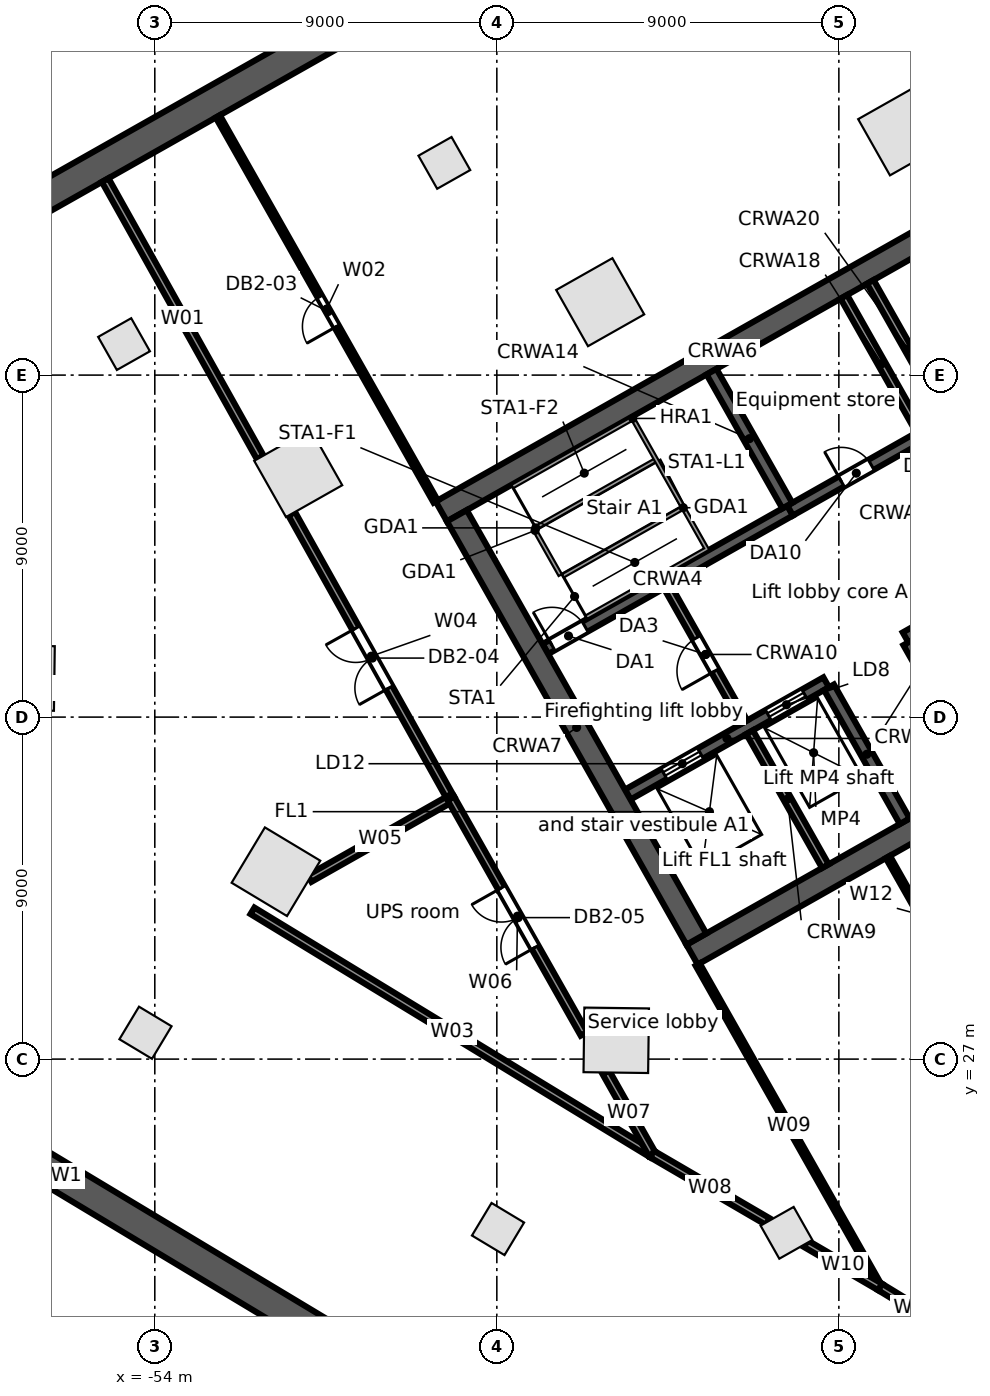
"""IFC4 building model, lengths in metres.
Left out: names, types, materials, properties, quantities, classifications, styles, units other than length and angle.
Written with IfcOpenShell. Run it as: python <this file> out.ifc"""

import sys

from ifc_helpers import new_model, si_unit, direction, frame, frame_2d, origin, origin_2d, place, context, subcontext, project, spatial, rectangle, extrude, element, fill, save


model = new_model("IFC4")
c1 = context("Model", 3, precision=1e-05, world=origin(), true_north=direction((0.0, 1.0)))
c2 = subcontext(c1, "Body", "Model", "MODEL_VIEW")
j1 = project(units=[si_unit("LENGTHUNIT", "METRE"), si_unit("PLANEANGLEUNIT", "RADIAN")], contexts=[c1])
p1 = place(None, origin())
s1 = spatial("IfcSite", under=j1, at=p1, CompositionType="ELEMENT")
p2 = place(p1, origin())
s2 = spatial("IfcBuilding", under=s1, at=p2, CompositionType="ELEMENT")
p3 = place(p2, frame((0.0, 0.0, -9.6)))
s3 = spatial("IfcBuildingStorey", under=s2, at=p3, CompositionType="ELEMENT", Elevation=-9.6)
p4 = place(p3, frame((-5.971, 78.503, -0.5), z_axis=(0.0, 0.0, 1.0), x_axis=(-0.870356741611, -0.492421711882, 0.0)))
e1 = element("IfcWall", 1, at=p4, inside=s3, PredefinedType="SOLIDWALL", context=c2, shape_type="SweptSolid", body=[
    extrude(rectangle(XDim=70.604, YDim=0.8, at=frame_2d((35.302, 0.0))), origin(), (0.0, 0.0, 1.0), 5.3),
])
p5 = place(p3, frame((-66.973, 30.208, -0.5), z_axis=(0.0, 0.0, 1.0), x_axis=(0.85716750858, -0.515037728943, 0.0)))
e2 = element("IfcWall", 2, at=p5, inside=s3, PredefinedType="SOLIDWALL", context=c2, shape_type="SweptSolid", body=[
    extrude(rectangle(XDim=24.44, YDim=0.8, at=frame_2d((12.22, 0.0))), origin(), (0.0, 0.0, 1.0), 5.3),
])
p6 = place(p3, frame((-35.211, 18.197, -0.5), z_axis=(0.0, 0.0, 1.0), x_axis=(0.870356230452, 0.492422615355, 0.0)))
e3 = element("IfcWall", 3, at=p6, inside=s3, PredefinedType="SOLIDWALL", context=c2, shape_type="SweptSolid", body=[
    extrude(rectangle(XDim=41.941, YDim=0.8, at=frame_2d((20.97, 0.0))), origin(), (0.0, 0.0, 1.0), 5.3),
])
for number, where, z_axis, x_axis in (
    (4, (-34.334, 51.414, -0.5), (0.0, 0.0, 1.0), (-0.87, -0.492, 0.0)),
    (5, (-42.28, 46.919, -0.5), (0.0, 0.0, 1.0), (-0.87, -0.492, 0.0)),
    (6, (-50.226, 42.423, -0.5), (0.0, 0.0, 1.0), (-0.87, -0.492, 0.0)),
    (7, (-57.493, 37.027, -0.5), (0.0, 0.0, 1.0), (-0.013, -1.0, 0.0)),
    (8, (-50.812, 31.931, -0.5), (0.0, 0.0, 1.0), (0.857, -0.515, 0.0)),
    (9, (-41.858, 27.495, -0.5), (0.0, 0.0, 1.0), (1.0, -0.013, 0.0)),
):
    element("IfcColumn", number, at=place(p3, frame(where, z_axis=z_axis, x_axis=x_axis)), inside=s3, PredefinedType="COLUMN", context=c2, shape_type="SweptSolid", body=[
        extrude(rectangle(XDim=1.7, YDim=1.7, at=origin_2d()), origin(), (0.0, 0.0, 1.0), 5.3),
    ])
for number, where, z_axis, x_axis in (
    (10, (-46.381, 50.584, -0.5), (0.0, 0.0, 1.0), (-0.87, -0.492, 0.0)),
    (11, (-54.81, 45.816, -0.5), (0.0, 0.0, 1.0), (-0.87, -0.492, 0.0)),
    (12, (-54.245, 27.694, -0.5), (0.0, 0.0, 1.0), (0.857, -0.515, 0.0)),
    (13, (-44.969, 22.528, -0.5), (0.0, 0.0, 1.0), (0.857, -0.515, 0.0)),
    (14, (-37.378, 22.429, -0.5), (0.0, 0.0, 1.0), (0.87, 0.492, 0.0)),
):
    element("IfcColumn", number, at=place(p3, frame(where, z_axis=z_axis, x_axis=x_axis)), inside=s3, PredefinedType="COLUMN", context=c2, shape_type="SweptSolid", body=[
        extrude(rectangle(XDim=1.0, YDim=1.0, at=origin_2d()), origin(), (0.0, 0.0, 1.0), 5.3),
    ])
p7 = place(p3, frame((-39.862, 29.749, 0.0), z_axis=(0.0, 0.0, 1.0), x_axis=(0.870350116061, 0.492433422375, 0.0)))
e15 = element("IfcWall", 15, at=p7, inside=s3, PredefinedType="SOLIDWALL", context=c2, shape_type="SweptSolid", body=[
    extrude(rectangle(XDim=17.0, YDim=0.6, at=frame_2d((8.5, 0.0))), origin(), (0.0, 0.0, 1.0), 4.4),
])
p8 = place(p7, frame((7.2, 0.0, 0.0)))
e16 = element("IfcOpeningElement", 16, at=p8, cuts=e15, PredefinedType="OPENING", context=c2, shape_type="SweptSolid", body=[
    extrude(rectangle(XDim=1.2, YDim=2.1, at=frame_2d((0.6, 1.05))), frame((0.0, 0.31, 0.0), z_axis=(0.0, -1.0, 0.0), x_axis=(1.0, 0.0, 0.0)), (0.0, 0.0, 1.0), 0.62),
])
p9 = place(p3, frame((-41.556, 33.961, 0.0), z_axis=(0.0, 0.0, 1.0), x_axis=(0.870343731308, 0.492444706919, 0.0)))
e17 = element("IfcWall", 17, at=p9, inside=s3, PredefinedType="SOLIDWALL", context=c2, shape_type="SweptSolid", body=[
    extrude(rectangle(XDim=6.0, YDim=0.3, at=frame_2d((3.0, 0.0))), origin(), (0.0, 0.0, 1.0), 4.4),
])
p10 = place(p9, frame((1.1, 0.0, 0.0)))
e18 = element("IfcOpeningElement", 18, at=p10, cuts=e17, PredefinedType="OPENING", context=c2, shape_type="SweptSolid", body=[
    extrude(rectangle(XDim=1.1, YDim=2.1, at=frame_2d((0.55, 1.05))), frame((0.0, 0.16, 0.0), z_axis=(0.0, -1.0, 0.0), x_axis=(1.0, 0.0, 0.0)), (0.0, 0.0, 1.0), 0.32),
])
p11 = place(p9, frame((4.25, 0.0, 0.0)))
e19 = element("IfcOpeningElement", 19, at=p11, cuts=e17, PredefinedType="OPENING", context=c2, shape_type="SweptSolid", body=[
    extrude(rectangle(XDim=1.1, YDim=2.1, at=frame_2d((0.55, 1.05))), frame((0.0, 0.16, 0.0), z_axis=(0.0, -1.0, 0.0), x_axis=(1.0, 0.0, 0.0)), (0.0, 0.0, 1.0), 0.32),
])
p12 = place(p3, frame((-34.245, 38.097, 0.0), z_axis=(0.0, 0.0, 1.0), x_axis=(0.870364910201, 0.492407273597, 0.0)))
e20 = element("IfcWall", 20, at=p12, inside=s3, PredefinedType="SOLIDWALL", context=c2, shape_type="SweptSolid", body=[
    extrude(rectangle(XDim=7.4, YDim=0.3, at=frame_2d((3.7, 0.0))), origin(), (0.0, 0.0, 1.0), 4.4),
])
p13 = place(p12, frame((6.2, 0.0, 0.0)))
e21 = element("IfcOpeningElement", 21, at=p13, cuts=e20, PredefinedType="OPENING", context=c2, shape_type="SweptSolid", body=[
    extrude(rectangle(XDim=1.0, YDim=2.1, at=frame_2d((0.5, 1.05))), frame((0.0, 0.16, 0.0), z_axis=(0.0, -1.0, 0.0), x_axis=(1.0, 0.0, 0.0)), (0.0, 0.0, 1.0), 0.32),
])
p14 = place(p3, frame((-43.723, 37.791, 0.0), z_axis=(0.0, 0.0, 1.0), x_axis=(0.87035077051, 0.49243226567, 0.0)))
e22 = element("IfcWall", 22, at=p14, inside=s3, PredefinedType="SOLIDWALL", context=c2, shape_type="SweptSolid", body=[
    extrude(rectangle(XDim=7.4, YDim=0.3, at=frame_2d((3.7, 0.0))), origin(), (0.0, 0.0, 1.0), 4.4),
])
p15 = place(p14, frame((0.2, 0.0, 0.0)))
e23 = element("IfcOpeningElement", 23, at=p15, cuts=e22, PredefinedType="OPENING", context=c2, shape_type="SweptSolid", body=[
    extrude(rectangle(XDim=1.0, YDim=2.1, at=frame_2d((0.5, 1.05))), frame((0.0, 0.16, 0.0), z_axis=(0.0, -1.0, 0.0), x_axis=(1.0, 0.0, 0.0)), (0.0, 0.0, 1.0), 0.32),
])
p16 = place(p3, frame((-37.282, 41.435, 0.0), z_axis=(0.0, 0.0, 1.0), x_axis=(0.870356516133, 0.492422110414, 0.0)))
e24 = element("IfcWall", 24, at=p16, inside=s3, PredefinedType="SOLIDWALL", context=c2, shape_type="SweptSolid", body=[
    extrude(rectangle(XDim=8.4, YDim=0.3, at=frame_2d((4.2, 0.0))), origin(), (0.0, 0.0, 1.0), 4.4),
])
p17 = place(p16, frame((6.2, 0.0, 0.0)))
e25 = element("IfcOpeningElement", 25, at=p17, cuts=e24, PredefinedType="OPENING", context=c2, shape_type="SweptSolid", body=[
    extrude(rectangle(XDim=1.1, YDim=2.1, at=frame_2d((0.55, 1.05))), frame((0.0, 0.16, 0.0), z_axis=(0.0, -1.0, 0.0), x_axis=(1.0, 0.0, 0.0)), (0.0, 0.0, 1.0), 0.32),
])
p18 = place(p16, frame((1.55, 0.0, 0.0)))
e26 = element("IfcOpeningElement", 26, at=p18, cuts=e24, PredefinedType="OPENING", context=c2, shape_type="SweptSolid", body=[
    extrude(rectangle(XDim=0.9, YDim=2.1, at=frame_2d((0.45, 1.05))), frame((0.0, 0.16, 0.0), z_axis=(0.0, -1.0, 0.0), x_axis=(1.0, 0.0, 0.0)), (0.0, 0.0, 1.0), 0.32),
])
p19 = place(p3, frame((-46.461, 41.412, 0.0), z_axis=(0.0, 0.0, 1.0), x_axis=(0.870350116061, 0.492433422375, 0.0)))
e27 = element("IfcWall", 27, at=p19, inside=s3, PredefinedType="SOLIDWALL", context=c2, shape_type="SweptSolid", body=[
    extrude(rectangle(XDim=17.0, YDim=0.6, at=frame_2d((8.5, 0.0))), origin(), (0.0, 0.0, 1.0), 4.4),
])
p20 = place(p3, frame((-46.052, 41.298, 0.0), z_axis=(0.0, 0.0, 1.0), x_axis=(0.492418598281, -0.870358503186, 0.0)))
e28 = element("IfcWall", 28, at=p20, inside=s3, PredefinedType="SOLIDWALL", context=c2, shape_type="SweptSolid", body=[
    extrude(rectangle(XDim=12.8, YDim=0.6, at=frame_2d((6.4, 0.0))), origin(), (0.0, 0.0, 1.0), 4.4),
])
p21 = place(p3, frame((-38.349, 35.603, 0.0), z_axis=(0.0, 0.0, 1.0), x_axis=(0.49241474071, -0.870360685654, 0.0)))
e29 = element("IfcWall", 29, at=p21, inside=s3, PredefinedType="SOLIDWALL", context=c2, shape_type="SweptSolid", body=[
    extrude(rectangle(XDim=4.05, YDim=0.2, at=frame_2d((2.025, 0.0))), origin(), (0.0, 0.0, 1.0), 4.4),
])
p22 = place(p3, frame((-40.516, 39.433, 0.0), z_axis=(0.0, 0.0, 1.0), x_axis=(0.492453559952, -0.87033872216, 0.0)))
e30 = element("IfcWall", 30, at=p22, inside=s3, PredefinedType="PARTITIONING", context=c2, shape_type="SweptSolid", body=[
    extrude(rectangle(XDim=4.1, YDim=0.2, at=frame_2d((2.05, 0.0))), origin(), (0.0, 0.0, 1.0), 4.4),
])
p23 = place(p22, frame((1.55, 0.0, 0.0)))
e31 = element("IfcOpeningElement", 31, at=p23, cuts=e30, PredefinedType="OPENING", context=c2, shape_type="SweptSolid", body=[
    extrude(rectangle(XDim=1.0, YDim=2.1, at=frame_2d((0.5, 1.05))), frame((0.0, 0.11, 0.0), z_axis=(0.0, -1.0, 0.0), x_axis=(1.0, 0.0, 0.0)), (0.0, 0.0, 1.0), 0.22),
])
p24 = place(p3, frame((-36.26, 36.785, 0.0), z_axis=(0.0, 0.0, 1.0), x_axis=(0.492440575896, -0.870346068648, 0.0)))
e32 = element("IfcWall", 32, at=p24, inside=s3, PredefinedType="SOLIDWALL", context=c2, shape_type="SweptSolid", body=[
    extrude(rectangle(XDim=4.05, YDim=0.3, at=frame_2d((2.025, 0.0))), origin(), (0.0, 0.0, 1.0), 4.4),
])
p25 = place(p3, frame((-39.35, 45.09, 0.0), z_axis=(0.0, 0.0, 1.0), x_axis=(0.49241474071, -0.870360685654, 0.0)))
e33 = element("IfcWall", 33, at=p25, inside=s3, PredefinedType="SOLIDWALL", context=c2, shape_type="SweptSolid", body=[
    extrude(rectangle(XDim=4.05, YDim=0.3, at=frame_2d((2.025, 0.0))), origin(), (0.0, 0.0, 1.0), 4.4),
])
p26 = place(p3, frame((-34.171, 37.967, 0.0), z_axis=(0.0, 0.0, 1.0), x_axis=(0.492394910396, -0.870371904542, 0.0)))
e34 = element("IfcWall", 34, at=p26, inside=s3, PredefinedType="SOLIDWALL", context=c2, shape_type="SweptSolid", body=[
    extrude(rectangle(XDim=4.05, YDim=0.3, at=frame_2d((2.025, 0.0))), origin(), (0.0, 0.0, 1.0), 4.4),
])
p27 = place(p3, frame((-35.869, 47.06, 0.0), z_axis=(0.0, 0.0, 1.0), x_axis=(0.49241474071, -0.870360685654, 0.0)))
e35 = element("IfcWall", 35, at=p27, inside=s3, PredefinedType="SOLIDWALL", context=c2, shape_type="SweptSolid", body=[
    extrude(rectangle(XDim=4.05, YDim=0.2, at=frame_2d((2.025, 0.0))), origin(), (0.0, 0.0, 1.0), 4.4),
])
p28 = place(p3, frame((-35.173, 47.454, 0.0), z_axis=(0.0, 0.0, 1.0), x_axis=(0.492440575896, -0.870346068648, 0.0)))
e36 = element("IfcWall", 36, at=p28, inside=s3, PredefinedType="SOLIDWALL", context=c2, shape_type="SweptSolid", body=[
    extrude(rectangle(XDim=4.05, YDim=0.2, at=frame_2d((2.025, 0.0))), origin(), (0.0, 0.0, 1.0), 4.4),
])
p29 = place(p3, frame((-55.306, 50.131, 0.0), z_axis=(0.0, 0.0, 1.0), x_axis=(0.488006573134, -0.872839953587, 0.0)))
e37 = element("IfcWall", 37, at=p29, inside=s3, PredefinedType="PARTITIONING", context=c2, shape_type="SweptSolid", body=[
    extrude(rectangle(XDim=8.36, YDim=0.2, at=frame_2d((4.18, 0.0))), origin(), (0.0, 0.0, 1.0), 3.68),
])
p30 = place(p3, frame((-52.342, 51.808, 0.0), z_axis=(0.0, 0.0, 1.0), x_axis=(0.492361213904, -0.870390966775, 0.0)))
e38 = element("IfcWall", 38, at=p30, inside=s3, PredefinedType="PARTITIONING", context=c2, shape_type="SweptSolid", body=[
    extrude(rectangle(XDim=11.644, YDim=0.125, at=frame_2d((5.822, 0.0))), origin(), (0.0, 0.0, 1.0), 3.68),
])
p31 = place(p30, frame((5.45, 0.0, 0.0)))
e39 = element("IfcOpeningElement", 39, at=p31, cuts=e38, PredefinedType="OPENING", context=c2, shape_type="SweptSolid", body=[
    extrude(rectangle(XDim=0.9, YDim=2.1, at=frame_2d((0.45, 1.05))), frame((0.0, 0.073, 0.0), z_axis=(0.0, -1.0, 0.0), x_axis=(1.0, 0.0, 0.0)), (0.0, 0.0, 1.0), 0.145),
])
p32 = place(p3, frame((-51.43, 30.902, 0.0), z_axis=(0.0, 0.0, 1.0), x_axis=(0.85415757912, -0.52001425945, 0.0)))
e40 = element("IfcWall", 40, at=p32, inside=s3, PredefinedType="PARTITIONING", context=c2, shape_type="SweptSolid", body=[
    extrude(rectangle(XDim=12.311, YDim=0.2, at=frame_2d((6.156, 0.0))), origin(), (0.0, 0.0, 1.0), 3.768),
])
p33 = place(p3, frame((-50.397, 41.35, 0.0), z_axis=(0.0, 0.0, 1.0), x_axis=(0.487964129566, -0.872863682517, 0.0)))
e41 = element("IfcWall", 41, at=p33, inside=s3, PredefinedType="PARTITIONING", context=c2, shape_type="SweptSolid", body=[
    extrude(rectangle(XDim=8.584, YDim=0.2, at=frame_2d((4.292, 0.0))), origin(), (0.0, 0.0, 1.0), 3.462),
])
p34 = place(p33, frame((3.45, 0.0, 0.0)))
e42 = element("IfcOpeningElement", 42, at=p34, cuts=e41, PredefinedType="OPENING", context=c2, shape_type="SweptSolid", body=[
    extrude(rectangle(XDim=1.8, YDim=2.1, at=frame_2d((0.9, 1.05))), frame((0.0, 0.11, 0.0), z_axis=(0.0, -1.0, 0.0), x_axis=(1.0, 0.0, 0.0)), (0.0, 0.0, 1.0), 0.22),
])
p35 = place(p3, frame((-49.928, 31.752, 0.0), z_axis=(0.0, 0.0, 1.0), x_axis=(0.87032337569, 0.492480681578, 0.0)))
e43 = element("IfcWall", 43, at=p35, inside=s3, PredefinedType="PARTITIONING", context=c2, shape_type="SweptSolid", body=[
    extrude(rectangle(XDim=4.274, YDim=0.2, at=frame_2d((2.137, 0.0))), origin(), (0.0, 0.0, 1.0), 4.4),
])
p36 = place(p3, frame((-46.208, 33.857, 0.0), z_axis=(0.0, 0.0, 1.0), x_axis=(0.492349035507, -0.870397855716, 0.0)))
e44 = element("IfcWall", 44, at=p36, inside=s3, PredefinedType="PARTITIONING", context=c2, shape_type="SweptSolid", body=[
    extrude(rectangle(XDim=7.113, YDim=0.2, at=frame_2d((3.556, 0.0))), origin(), (0.0, 0.0, 1.0), 3.68),
])
p37 = place(p36, frame((2.7, 0.0, 0.0)))
e45 = element("IfcOpeningElement", 45, at=p37, cuts=e44, PredefinedType="OPENING", context=c2, shape_type="SweptSolid", body=[
    extrude(rectangle(XDim=1.8, YDim=2.1, at=frame_2d((0.9, 1.05))), frame((0.0, 0.11, 0.0), z_axis=(0.0, -1.0, 0.0), x_axis=(1.0, 0.0, 0.0)), (0.0, 0.0, 1.0), 0.22),
])
p38 = place(p3, frame((-42.129, 26.648, 0.0), z_axis=(0.0, 0.0, 1.0), x_axis=(0.492298479406, -0.87042645133, 0.0)))
e46 = element("IfcWall", 46, at=p38, inside=s3, PredefinedType="PARTITIONING", context=c2, shape_type="SweptSolid", body=[
    extrude(rectangle(XDim=2.468, YDim=0.2, at=frame_2d((1.234, 0.0))), origin(), (0.0, 0.0, 1.0), 4.4),
])
p39 = place(p3, frame((-40.914, 24.5, 0.0), z_axis=(0.0, 0.0, 1.0), x_axis=(0.863869354875, -0.503715929575, 0.0)))
e47 = element("IfcWall", 47, at=p39, inside=s3, PredefinedType="PARTITIONING", context=c2, shape_type="SweptSolid", body=[
    extrude(rectangle(XDim=3.524, YDim=0.2, at=frame_2d((1.762, 0.0))), origin(), (0.0, 0.0, 1.0), 4.4),
])
p40 = place(p3, frame((-39.715, 29.488, 0.0), z_axis=(0.0, 0.0, 1.0), x_axis=(0.492486226821, -0.870320237839, 0.0)))
e48 = element("IfcWall", 48, at=p40, inside=s3, PredefinedType="PARTITIONING", context=c2, shape_type="SweptSolid", body=[
    extrude(rectangle(XDim=9.75, YDim=0.125, at=frame_2d((4.875, 0.0))), origin(), (0.0, 0.0, 1.0), 3.672),
])
p41 = place(p3, frame((-36.869, 22.142, 0.0), z_axis=(0.0, 0.0, 1.0), x_axis=(0.863923586103, -0.503622911884, 0.0)))
e49 = element("IfcWall", 49, at=p41, inside=s3, PredefinedType="PARTITIONING", context=c2, shape_type="SweptSolid", body=[
    extrude(rectangle(XDim=2.264, YDim=0.2, at=frame_2d((1.132, 0.0))), origin(), (0.0, 0.0, 1.0), 4.4),
])
p42 = place(p3, frame((-34.913, 21.002, 0.0), z_axis=(0.0, 0.0, 1.0), x_axis=(0.853754667267, -0.520675492145, 0.0)))
e50 = element("IfcWall", 50, at=p42, inside=s3, PredefinedType="PARTITIONING", context=c2, shape_type="SweptSolid", body=[
    extrude(rectangle(XDim=2.168, YDim=0.2, at=frame_2d((1.084, 0.0))), origin(), (0.0, 0.0, 1.0), 4.4),
])
p43 = place(p3, frame((-34.71, 32.319, 0.0), z_axis=(0.0, 0.0, 1.0), x_axis=(0.492310098002, -0.870419879946, 0.0)))
e51 = element("IfcWall", 51, at=p43, inside=s3, PredefinedType="PARTITIONING", context=c2, shape_type="SweptSolid", body=[
    extrude(rectangle(XDim=3.5, YDim=0.125, at=frame_2d((1.75, 0.0))), origin(), (0.0, 0.0, 1.0), 3.672),
])
p44 = place(p10, origin())
e52 = element("IfcDoor", 52, at=p44, inside=s3, OperationType="DOUBLE_DOOR_SLIDING", PredefinedType="DOOR", context=c2, shape_type="SweptSolid", body=[
    extrude(rectangle(XDim=1.1, YDim=2.1, at=frame_2d((0.55, 1.05))), frame((0.0, 0.025, 0.0), z_axis=(0.0, -1.0, 0.0), x_axis=(1.0, 0.0, 0.0)), (0.0, 0.0, 1.0), 0.05),
])
fill(e18, e52)
p45 = place(p11, origin())
e53 = element("IfcDoor", 53, at=p45, inside=s3, OperationType="DOUBLE_DOOR_SLIDING", PredefinedType="DOOR", context=c2, shape_type="SweptSolid", body=[
    extrude(rectangle(XDim=1.1, YDim=2.1, at=frame_2d((0.55, 1.05))), frame((0.0, 0.025, 0.0), z_axis=(0.0, -1.0, 0.0), x_axis=(1.0, 0.0, 0.0)), (0.0, 0.0, 1.0), 0.05),
])
fill(e19, e53)
p46 = place(p15, origin())
e54 = element("IfcDoor", 54, at=p46, inside=s3, OperationType="SINGLE_SWING_LEFT", PredefinedType="DOOR", context=c2, shape_type="SweptSolid", body=[
    extrude(rectangle(XDim=1.0, YDim=2.1, at=frame_2d((0.5, 1.05))), frame((0.0, 0.025, 0.0), z_axis=(0.0, -1.0, 0.0), x_axis=(1.0, 0.0, 0.0)), (0.0, 0.0, 1.0), 0.05),
])
fill(e23, e54)
p47 = place(p23, frame((1.0, 0.0, 0.0), z_axis=(0.0, 0.0, 1.0), x_axis=(-1.0, 0.0, 0.0)))
e55 = element("IfcDoor", 55, at=p47, inside=s3, OperationType="SINGLE_SWING_LEFT", PredefinedType="DOOR", context=c2, shape_type="SweptSolid", body=[
    extrude(rectangle(XDim=1.0, YDim=2.1, at=frame_2d((0.5, 1.05))), frame((0.0, 0.025, 0.0), z_axis=(0.0, -1.0, 0.0), x_axis=(1.0, 0.0, 0.0)), (0.0, 0.0, 1.0), 0.05),
])
fill(e31, e55)
p48 = place(p18, origin())
e56 = element("IfcDoor", 56, at=p48, inside=s3, OperationType="SINGLE_SWING_LEFT", PredefinedType="DOOR", context=c2, shape_type="SweptSolid", body=[
    extrude(rectangle(XDim=0.9, YDim=2.1, at=frame_2d((0.45, 1.05))), frame((0.0, 0.025, 0.0), z_axis=(0.0, -1.0, 0.0), x_axis=(1.0, 0.0, 0.0)), (0.0, 0.0, 1.0), 0.05),
])
fill(e26, e56)
p49 = place(p31, frame((0.9, 0.0, 0.0), z_axis=(0.0, 0.0, 1.0), x_axis=(-1.0, 0.0, 0.0)))
e57 = element("IfcDoor", 57, at=p49, inside=s3, OperationType="SINGLE_SWING_LEFT", PredefinedType="DOOR", context=c2, shape_type="SweptSolid", body=[
    extrude(rectangle(XDim=0.9, YDim=2.1, at=frame_2d((0.45, 1.05))), frame((0.0, 0.025, 0.0), z_axis=(0.0, -1.0, 0.0), x_axis=(1.0, 0.0, 0.0)), (0.0, 0.0, 1.0), 0.05),
])
fill(e39, e57)
p50 = place(p34, frame((1.8, 0.0, 0.0), z_axis=(0.0, 0.0, 1.0), x_axis=(-1.0, 0.0, 0.0)))
e58 = element("IfcDoor", 58, at=p50, inside=s3, OperationType="DOUBLE_DOOR_SINGLE_SWING", PredefinedType="DOOR", context=c2, shape_type="SweptSolid", body=[
    extrude(rectangle(XDim=1.8, YDim=2.1, at=frame_2d((0.9, 1.05))), frame((0.0, 0.025, 0.0), z_axis=(0.0, -1.0, 0.0), x_axis=(1.0, 0.0, 0.0)), (0.0, 0.0, 1.0), 0.05),
])
fill(e42, e58)
p51 = place(p37, frame((1.8, 0.0, 0.0), z_axis=(0.0, 0.0, 1.0), x_axis=(-1.0, 0.0, 0.0)))
e59 = element("IfcDoor", 59, at=p51, inside=s3, OperationType="DOUBLE_DOOR_SINGLE_SWING", PredefinedType="DOOR", context=c2, shape_type="SweptSolid", body=[
    extrude(rectangle(XDim=1.8, YDim=2.1, at=frame_2d((0.9, 1.05))), frame((0.0, 0.025, 0.0), z_axis=(0.0, -1.0, 0.0), x_axis=(1.0, 0.0, 0.0)), (0.0, 0.0, 1.0), 0.05),
])
fill(e45, e59)
save(model, sys.argv[1])
